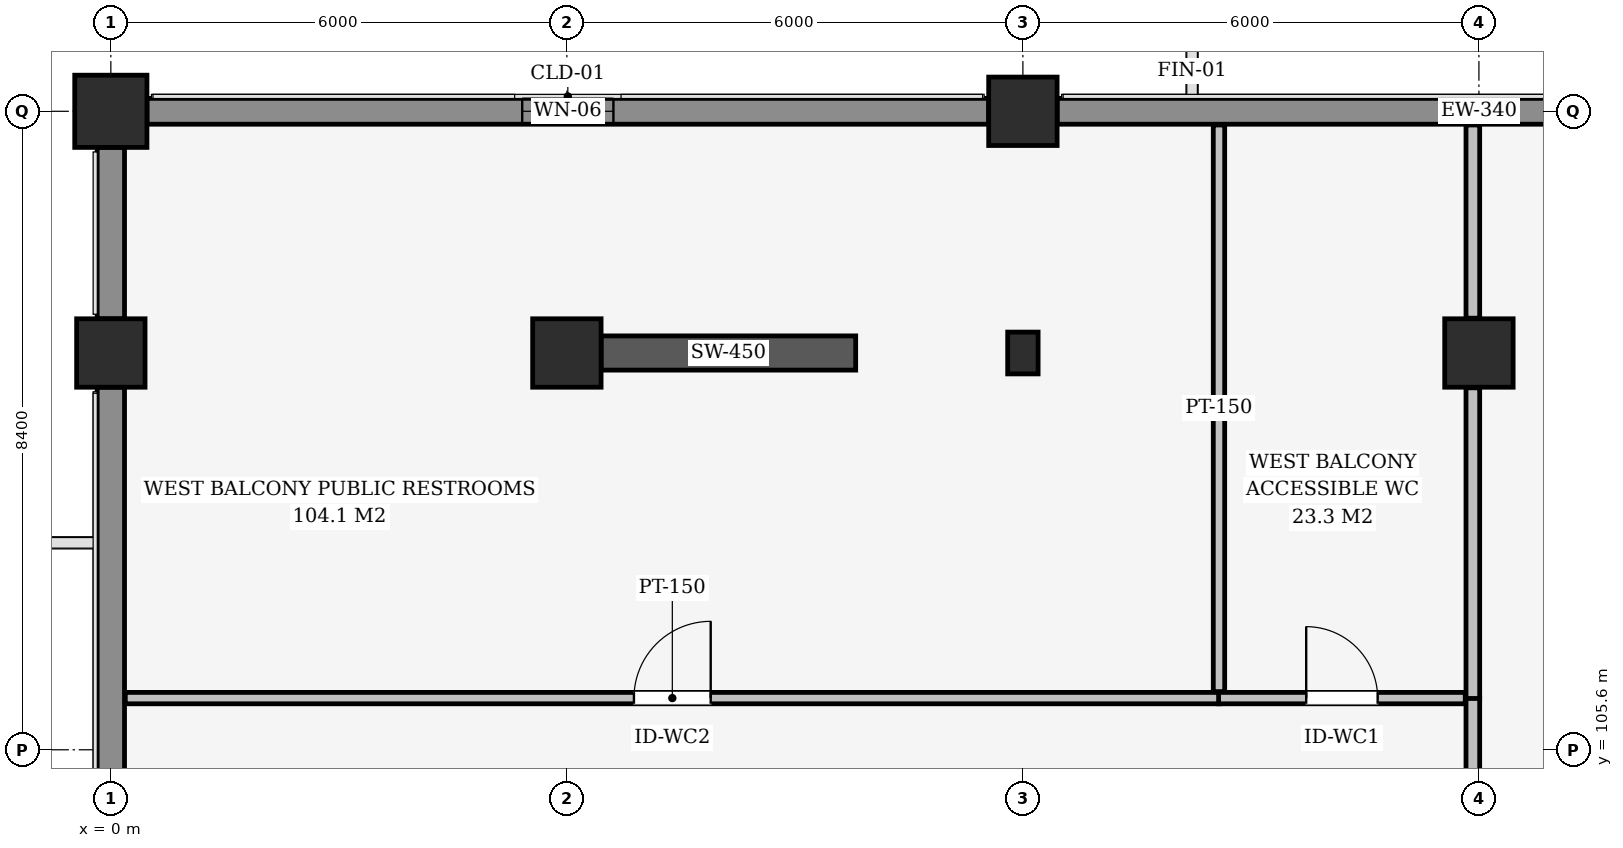
"""IFC4 building model, lengths in metres.
Left out: names, types, materials, properties, quantities, classifications, styles, units other than length and angle.
Written with IfcOpenShell. Run it as: python <this file> out.ifc"""

import sys

from ifc_helpers import new_model, si_unit, direction, frame, frame_2d, origin, origin_2d, place, context, subcontext, project, spatial, rectangle, extrude, element, fill, save


model = new_model("IFC4")
c1 = context("Model", 3, precision=1e-05, world=origin(), true_north=direction((0.0, 1.0)))
c2 = subcontext(c1, "Body", "Model", "MODEL_VIEW")
j1 = project(units=[si_unit("LENGTHUNIT", "METRE"), si_unit("PLANEANGLEUNIT", "RADIAN")], contexts=[c1])
p1 = place(None, origin())
s1 = spatial("IfcSite", under=j1, at=p1, CompositionType="ELEMENT")
p2 = place(p1, origin())
s2 = spatial("IfcBuilding", under=s1, at=p2, CompositionType="ELEMENT")
p3 = place(p2, frame((0.0, 0.0, 4.8)))
s3 = spatial("IfcBuildingStorey", under=s2, at=p3, CompositionType="ELEMENT", Elevation=4.8)
p4 = place(p3, frame((0.0, 114.0, 0.0), z_axis=(0.0, 0.0, 1.0), x_axis=(1.0, 0.0, 0.0)))
e1 = element("IfcColumn", 1, at=p4, inside=s3, PredefinedType="COLUMN", context=c2, shape_type="SweptSolid", body=[
    extrude(rectangle(XDim=0.95, YDim=0.95, at=origin_2d()), origin(), (0.0, 0.0, 1.0), 4.5),
])
for number, where, z_axis, x_axis in (
    (2, (12.0, 114.0, 0.0), (0.0, 0.0, 1.0), (1.0, 0.0, 0.0)),
    (3, (0.0, 110.82, 0.0), (0.0, 0.0, 1.0), (1.0, 0.0, 0.0)),
    (4, (6.0, 110.82, 0.0), (0.0, 0.0, 1.0), (1.0, 0.0, 0.0)),
    (5, (18.0, 110.82, 0.0), (0.0, 0.0, 1.0), (1.0, 0.0, 0.0)),
):
    element("IfcColumn", number, at=place(p3, frame(where, z_axis=z_axis, x_axis=x_axis)), inside=s3, PredefinedType="COLUMN", context=c2, shape_type="SweptSolid", body=[
        extrude(rectangle(XDim=0.9, YDim=0.9, at=origin_2d()), origin(), (0.0, 0.0, 1.0), 4.5),
    ])
p5 = place(p3, frame((12.0, 110.82, 0.0), z_axis=(0.0, 0.0, 1.0), x_axis=(1.0, 0.0, 0.0)))
e6 = element("IfcColumn", 6, at=p5, inside=s3, PredefinedType="PILASTER", context=c2, shape_type="SweptSolid", body=[
    extrude(rectangle(XDim=0.4, YDim=0.55, at=origin_2d()), origin(), (0.0, 0.0, 1.0), 4.5),
])
p6 = place(p3, frame((6.45, 110.82, 0.0), z_axis=(0.0, 0.0, 1.0), x_axis=(1.0, 0.0, 0.0)))
e7 = element("IfcWall", 7, at=p6, inside=s3, PredefinedType="SHEAR", context=c2, shape_type="SweptSolid", body=[
    extrude(rectangle(XDim=3.35, YDim=0.45, at=frame_2d((1.675, 0.0))), origin(), (0.0, 0.0, 1.0), 3.505),
])
p7 = place(p3, frame((0.475, 114.0, 0.0), z_axis=(0.0, 0.0, 1.0), x_axis=(1.0, 0.0, 0.0)))
e8 = element("IfcWall", 8, at=p7, inside=s3, PredefinedType="SOLIDWALL", context=c2, shape_type="SweptSolid", body=[
    extrude(rectangle(XDim=11.075, YDim=0.34, at=frame_2d((5.538, 0.0))), origin(), (0.0, 0.0, 1.0), 3.487),
])
p8 = place(p7, frame((4.938, 0.0, 0.85)))
e9 = element("IfcOpeningElement", 9, at=p8, cuts=e8, PredefinedType="OPENING", context=c2, shape_type="SweptSolid", body=[
    extrude(rectangle(XDim=1.2, YDim=1.5, at=frame_2d((0.6, 0.75))), frame((0.0, 0.18, 0.0), z_axis=(0.0, -1.0, 0.0), x_axis=(1.0, 0.0, 0.0)), (0.0, 0.0, 1.0), 0.36),
])
p9 = place(p3, frame((12.45, 114.0, 0.0), z_axis=(0.0, 0.0, 1.0), x_axis=(1.0, 0.0, 0.0)))
e10 = element("IfcWall", 10, at=p9, inside=s3, PredefinedType="SOLIDWALL", context=c2, shape_type="SweptSolid", body=[
    extrude(rectangle(XDim=11.1, YDim=0.34, at=frame_2d((5.55, 0.0))), origin(), (0.0, 0.0, 1.0), 3.487),
])
p10 = place(p9, frame((6.642, 0.0, 0.85)))
e11 = element("IfcOpeningElement", 11, at=p10, cuts=e10, PredefinedType="OPENING", context=c2, shape_type="SweptSolid", body=[
    extrude(rectangle(XDim=2.7, YDim=1.95, at=frame_2d((1.35, 0.975))), frame((0.0, 0.18, 0.0), z_axis=(0.0, -1.0, 0.0), x_axis=(1.0, 0.0, 0.0)), (0.0, 0.0, 1.0), 0.36),
])
p11 = place(p3, frame((0.0, 97.575, 0.0), z_axis=(0.0, 0.0, 1.0), x_axis=(0.0, 1.0, 0.0)))
e12 = element("IfcWall", 12, at=p11, inside=s3, PredefinedType="SOLIDWALL", context=c2, shape_type="SweptSolid", body=[
    extrude(rectangle(XDim=12.795, YDim=0.36, at=frame_2d((6.397, 0.0))), origin(), (0.0, 0.0, 1.0), 3.569),
])
p12 = place(p11, frame((5.573, 0.0, 0.85)))
e13 = element("IfcOpeningElement", 13, at=p12, cuts=e12, PredefinedType="OPENING", context=c2, shape_type="SweptSolid", body=[
    extrude(rectangle(XDim=1.65, YDim=1.75, at=frame_2d((0.825, 0.875))), frame((0.0, 0.19, 0.0), z_axis=(0.0, -1.0, 0.0), x_axis=(1.0, 0.0, 0.0)), (0.0, 0.0, 1.0), 0.38),
])
p13 = place(p3, frame((0.0, 111.27, 0.0), z_axis=(0.0, 0.0, 1.0), x_axis=(0.0, 1.0, 0.0)))
e14 = element("IfcWall", 14, at=p13, inside=s3, PredefinedType="SOLIDWALL", context=c2, shape_type="SweptSolid", body=[
    extrude(rectangle(XDim=2.255, YDim=0.36, at=frame_2d((1.127, 0.0))), origin(), (0.0, 0.0, 1.0), 3.568),
])
p14 = place(p3, frame((17.92, 105.005, 0.0), z_axis=(0.0, 0.0, 1.0), x_axis=(0.0, 1.0, 0.0)))
e15 = element("IfcWall", 15, at=p14, inside=s3, PredefinedType="PARTITIONING", context=c2, shape_type="SweptSolid", body=[
    extrude(rectangle(XDim=1.28, YDim=0.18, at=frame_2d((0.64, 0.0))), origin(), (0.0, 0.0, 1.0), 4.5),
])
p15 = place(p3, frame((17.92, 106.275, 0.0), z_axis=(0.0, 0.0, 1.0), x_axis=(0.0, 1.0, 0.0)))
e16 = element("IfcWall", 16, at=p15, inside=s3, PredefinedType="PARTITIONING", context=c2, shape_type="SweptSolid", body=[
    extrude(rectangle(XDim=4.087, YDim=0.18, at=frame_2d((2.043, 0.0))), origin(), (0.0, 0.0, 1.0), 4.5),
])
p16 = place(p3, frame((17.92, 111.278, 0.0), z_axis=(0.0, 0.0, 1.0), x_axis=(0.0, 1.0, 0.0)))
e17 = element("IfcWall", 17, at=p16, inside=s3, PredefinedType="PARTITIONING", context=c2, shape_type="SweptSolid", body=[
    extrude(rectangle(XDim=2.542, YDim=0.18, at=frame_2d((1.271, 0.0))), origin(), (0.0, 0.0, 1.0), 4.5),
])
p17 = place(p3, frame((0.19, 106.28, 0.0), z_axis=(0.0, 0.0, 1.0), x_axis=(1.0, 0.0, 0.0)))
e18 = element("IfcWall", 18, at=p17, inside=s3, PredefinedType="PARTITIONING", context=c2, shape_type="SweptSolid", body=[
    extrude(rectangle(XDim=14.395, YDim=0.15, at=frame_2d((7.198, 0.0))), origin(), (0.0, 0.0, 1.0), 4.18),
])
p18 = place(p17, frame((6.692, 0.0, 0.0)))
e19 = element("IfcOpeningElement", 19, at=p18, cuts=e18, PredefinedType="OPENING", context=c2, shape_type="SweptSolid", body=[
    extrude(rectangle(XDim=1.01, YDim=2.1, at=frame_2d((0.505, 1.05))), frame((0.0, 0.085, 0.0), z_axis=(0.0, -1.0, 0.0), x_axis=(1.0, 0.0, 0.0)), (0.0, 0.0, 1.0), 0.17),
])
p19 = place(p3, frame((14.575, 106.28, 0.0), z_axis=(0.0, 0.0, 1.0), x_axis=(1.0, 0.0, 0.0)))
e20 = element("IfcWall", 20, at=p19, inside=s3, PredefinedType="PARTITIONING", context=c2, shape_type="SweptSolid", body=[
    extrude(rectangle(XDim=3.245, YDim=0.15, at=frame_2d((1.623, 0.0))), origin(), (0.0, 0.0, 1.0), 4.18),
])
p20 = place(p19, frame((1.153, 0.0, 0.0)))
e21 = element("IfcOpeningElement", 21, at=p20, cuts=e20, PredefinedType="OPENING", context=c2, shape_type="SweptSolid", body=[
    extrude(rectangle(XDim=0.94, YDim=2.1, at=frame_2d((0.47, 1.05))), frame((0.0, 0.085, 0.0), z_axis=(0.0, -1.0, 0.0), x_axis=(1.0, 0.0, 0.0)), (0.0, 0.0, 1.0), 0.17),
])
p21 = place(p3, frame((14.58, 106.365, 0.0), z_axis=(0.0, 0.0, 1.0), x_axis=(0.0, 1.0, 0.0)))
e22 = element("IfcWall", 22, at=p21, inside=s3, PredefinedType="PARTITIONING", context=c2, shape_type="SweptSolid", body=[
    extrude(rectangle(XDim=7.455, YDim=0.15, at=frame_2d((3.728, 0.0))), origin(), (0.0, 0.0, 1.0), 3.723),
])
p22 = place(p8, origin())
e23 = element("IfcWindow", 23, at=p22, inside=s3, PartitioningType="SINGLE_PANEL", PredefinedType="WINDOW", context=c2, shape_type="SweptSolid", body=[
    extrude(rectangle(XDim=1.2, YDim=1.5, at=frame_2d((0.6, 0.75))), frame((0.0, 0.03, 0.0), z_axis=(0.0, -1.0, 0.0), x_axis=(1.0, 0.0, 0.0)), (0.0, 0.0, 1.0), 0.06),
])
fill(e9, e23)
p23 = place(p18, origin())
e24 = element("IfcDoor", 24, at=p23, inside=s3, OperationType="SINGLE_SWING_RIGHT", PredefinedType="DOOR", context=c2, shape_type="SweptSolid", body=[
    extrude(rectangle(XDim=1.01, YDim=2.1, at=frame_2d((0.505, 1.05))), frame((0.0, 0.025, 0.0), z_axis=(0.0, -1.0, 0.0), x_axis=(1.0, 0.0, 0.0)), (0.0, 0.0, 1.0), 0.05),
])
fill(e19, e24)
p24 = place(p20, origin())
e25 = element("IfcDoor", 25, at=p24, inside=s3, OperationType="SINGLE_SWING_LEFT", PredefinedType="DOOR", context=c2, shape_type="SweptSolid", body=[
    extrude(rectangle(XDim=0.94, YDim=2.1, at=frame_2d((0.47, 1.05))), frame((0.0, 0.025, 0.0), z_axis=(0.0, -1.0, 0.0), x_axis=(1.0, 0.0, 0.0)), (0.0, 0.0, 1.0), 0.05),
])
fill(e21, e25)
save(model, sys.argv[1])
